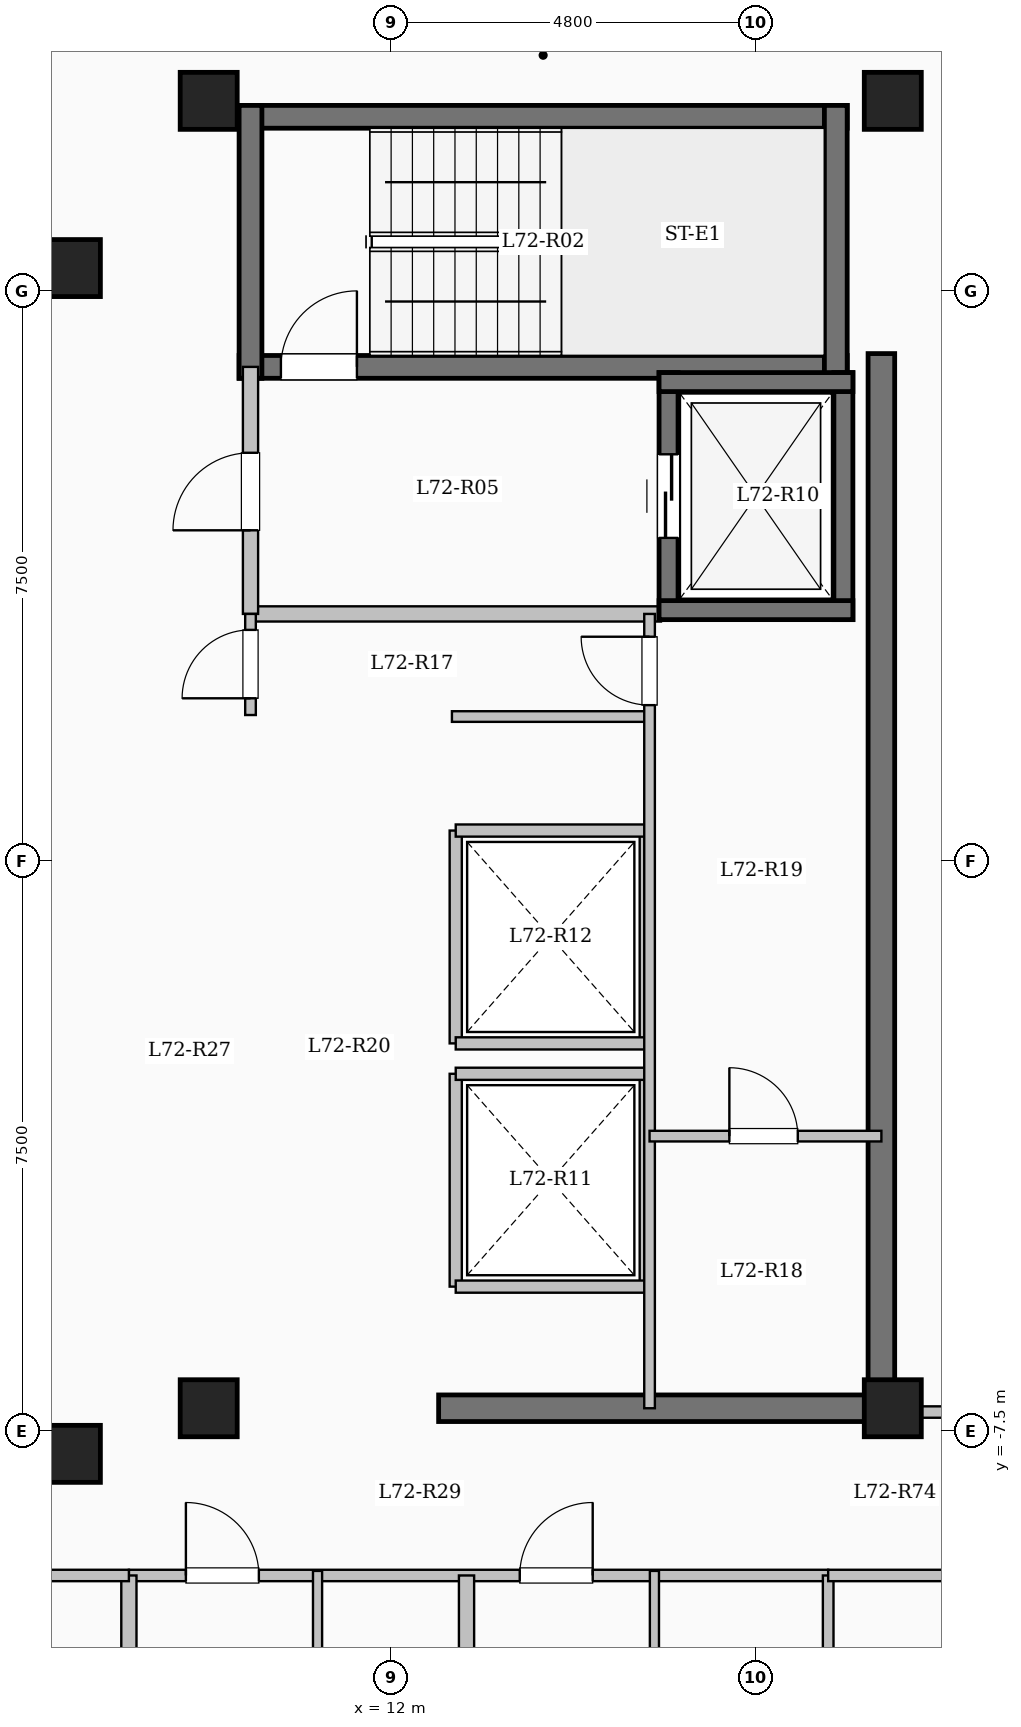
"""IFC4 building model, lengths in metres.
Left out: names, types, materials, properties, quantities, classifications, styles, units other than length and angle.
Written with IfcOpenShell. Run it as: python <this file> out.ifc"""

import sys

from ifc_helpers import new_model, si_unit, direction, frame, frame_2d, origin, origin_2d, place, context, subcontext, project, spatial, rectangle, extrude, element, fill, save


model = new_model("IFC4")
c1 = context("Model", 3, precision=1e-05, world=origin(), true_north=direction((0.0, 1.0)))
c2 = subcontext(c1, "Body", "Model", "MODEL_VIEW")
j1 = project(units=[si_unit("LENGTHUNIT", "METRE"), si_unit("PLANEANGLEUNIT", "RADIAN")], contexts=[c1])
p1 = place(None, origin())
s1 = spatial("IfcSite", under=j1, at=p1, CompositionType="ELEMENT")
p2 = place(p1, origin())
s2 = spatial("IfcBuilding", under=s1, at=p2, CompositionType="ELEMENT")
p3 = place(p2, frame((0.0, 0.0, 264.95)))
s3 = spatial("IfcBuildingStorey", under=s2, at=p3, CompositionType="ELEMENT", Elevation=264.95)
for number, where, z_axis, x_axis in (
    (1, (7.8, -7.8, 0.0), (0.0, 0.0, 1.0), (1.0, 0.0, 0.0)),
    (2, (7.8, 7.8, 0.0), (0.0, 0.0, 1.0), (1.0, 0.0, 0.0)),
    (3, (9.6, -7.2, 0.0), (0.0, 0.0, 1.0), (1.0, 0.0, 0.0)),
    (4, (9.6, 10.0, 0.0), (0.0, 0.0, 1.0), (1.0, 0.0, 0.0)),
    (5, (18.6, -7.2, 0.0), (0.0, 0.0, 1.0), (1.0, 0.0, 0.0)),
    (6, (18.6, 10.0, 0.0), (0.0, 0.0, 1.0), (1.0, 0.0, 0.0)),
):
    element("IfcColumn", number, at=place(p3, frame(where, z_axis=z_axis, x_axis=x_axis)), inside=s3, PredefinedType="COLUMN", context=c2, shape_type="SweptSolid", body=[
        extrude(rectangle(XDim=0.75, YDim=0.75, at=origin_2d()), origin(), (0.0, 0.0, 1.0), 3.35),
    ])
p4 = place(p3, frame((10.0, 9.79, 0.0), z_axis=(0.0, 0.0, 1.0), x_axis=(1.0, 0.0, 0.0)))
e7 = element("IfcWall", 7, at=p4, inside=s3, PredefinedType="SHEAR", context=c2, shape_type="SweptSolid", body=[
    extrude(rectangle(XDim=8.0, YDim=0.3, at=frame_2d((4.0, 0.0))), origin(), (0.0, 0.0, 1.0), 3.35),
])
p5 = place(p3, frame((10.0, 6.5, 0.0), z_axis=(0.0, 0.0, 1.0), x_axis=(1.0, 0.0, 0.0)))
e8 = element("IfcWall", 8, at=p5, inside=s3, PredefinedType="SHEAR", context=c2, shape_type="SweptSolid", body=[
    extrude(rectangle(XDim=8.0, YDim=0.3, at=frame_2d((4.0, 0.0))), origin(), (0.0, 0.0, 1.0), 3.35),
])
p6 = place(p5, frame((0.55, 0.0, 0.0)))
e9 = element("IfcOpeningElement", 9, at=p6, cuts=e8, PredefinedType="OPENING", context=c2, shape_type="SweptSolid", body=[
    extrude(rectangle(XDim=1.0, YDim=2.15, at=frame_2d((0.5, 1.075))), frame((0.0, 0.16, 0.0), z_axis=(0.0, -1.0, 0.0), x_axis=(1.0, 0.0, 0.0)), (0.0, 0.0, 1.0), 0.32),
])
for number, where, z_axis, x_axis in (
    (10, (10.15, 6.35, 0.0), (0.0, 0.0, 1.0), (0.0, 1.0, 0.0)),
    (11, (17.85, 6.35, 0.0), (0.0, 0.0, 1.0), (0.0, 1.0, 0.0)),
):
    element("IfcWall", number, at=place(p3, frame(where, z_axis=z_axis, x_axis=x_axis)), inside=s3, PredefinedType="SHEAR", context=c2, shape_type="SweptSolid", body=[
        extrude(rectangle(XDim=3.59, YDim=0.3, at=frame_2d((1.795, 0.0))), origin(), (0.0, 0.0, 1.0), 3.35),
    ])
p7 = place(p3, frame((10.15, 3.25, 0.0), z_axis=(0.0, 0.0, 1.0), x_axis=(1.0, 0.0, 0.0)))
e12 = element("IfcWall", 12, at=p7, inside=s3, PredefinedType="SOLIDWALL", context=c2, shape_type="SweptSolid", body=[
    extrude(rectangle(XDim=5.4, YDim=0.2, at=frame_2d((2.7, 0.0))), origin(), (0.0, 0.0, 1.0), 3.1),
])
p8 = place(p3, frame((10.15, 3.25, 0.0), z_axis=(0.0, 0.0, 1.0), x_axis=(0.0, 1.0, 0.0)))
e13 = element("IfcWall", 13, at=p8, inside=s3, PredefinedType="SOLIDWALL", context=c2, shape_type="SweptSolid", body=[
    extrude(rectangle(XDim=3.25, YDim=0.2, at=frame_2d((1.625, 0.0))), origin(), (0.0, 0.0, 1.0), 3.1),
])
p9 = place(p8, frame((1.1, 0.0, 0.0)))
e14 = element("IfcOpeningElement", 14, at=p9, cuts=e13, PredefinedType="OPENING", context=c2, shape_type="SweptSolid", body=[
    extrude(rectangle(XDim=1.02, YDim=2.15, at=frame_2d((0.51, 1.075))), frame((0.0, 0.11, 0.0), z_axis=(0.0, -1.0, 0.0), x_axis=(1.0, 0.0, 0.0)), (0.0, 0.0, 1.0), 0.22),
])
p10 = place(p3, frame((15.65, 3.175, 0.0), z_axis=(0.0, 0.0, 1.0), x_axis=(0.0, 1.0, 0.0)))
e15 = element("IfcWall", 15, at=p10, inside=s3, PredefinedType="SHEAR", context=c2, shape_type="SweptSolid", body=[
    extrude(rectangle(XDim=3.25, YDim=0.25, at=frame_2d((1.625, 0.0))), origin(), (0.0, 0.0, 1.0), 3.35),
])
p11 = place(p10, frame((1.075, 0.0, 0.0)))
e16 = element("IfcOpeningElement", 16, at=p11, cuts=e15, PredefinedType="OPENING", context=c2, shape_type="SweptSolid", body=[
    extrude(rectangle(XDim=1.1, YDim=2.15, at=frame_2d((0.55, 1.075))), frame((0.0, 0.135, 0.0), z_axis=(0.0, -1.0, 0.0), x_axis=(1.0, 0.0, 0.0)), (0.0, 0.0, 1.0), 0.27),
])
p12 = place(p3, frame((17.95, 3.175, 0.0), z_axis=(0.0, 0.0, 1.0), x_axis=(0.0, 1.0, 0.0)))
e17 = element("IfcWall", 17, at=p12, inside=s3, PredefinedType="SHEAR", context=c2, shape_type="SweptSolid", body=[
    extrude(rectangle(XDim=3.25, YDim=0.25, at=frame_2d((1.625, 0.0))), origin(), (0.0, 0.0, 1.0), 3.35),
])
for number, where, z_axis, x_axis in (
    (18, (15.525, 3.3, 0.0), (0.0, 0.0, 1.0), (1.0, 0.0, 0.0)),
    (19, (15.525, 6.3, 0.0), (0.0, 0.0, 1.0), (1.0, 0.0, 0.0)),
):
    element("IfcWall", number, at=place(p3, frame(where, z_axis=z_axis, x_axis=x_axis)), inside=s3, PredefinedType="SHEAR", context=c2, shape_type="SweptSolid", body=[
        extrude(rectangle(XDim=2.55, YDim=0.25, at=frame_2d((1.275, 0.0))), origin(), (0.0, 0.0, 1.0), 3.35),
    ])
for number, where, z_axis, x_axis in (
    (20, (12.85, -5.6, 0.0), (0.0, 0.0, 1.0), (0.0, 1.0, 0.0)),
    (21, (15.35, -5.6, 0.0), (0.0, 0.0, 1.0), (0.0, 1.0, 0.0)),
):
    element("IfcWall", number, at=place(p3, frame(where, z_axis=z_axis, x_axis=x_axis)), inside=s3, PredefinedType="SOLIDWALL", context=c2, shape_type="SweptSolid", body=[
        extrude(rectangle(XDim=2.8, YDim=0.16, at=frame_2d((1.4, 0.0))), origin(), (0.0, 0.0, 1.0), 3.1),
    ])
for number, where, z_axis, x_axis in (
    (22, (12.85, -5.6, 0.0), (0.0, 0.0, 1.0), (1.0, 0.0, 0.0)),
    (23, (12.85, -2.8, 0.0), (0.0, 0.0, 1.0), (1.0, 0.0, 0.0)),
):
    element("IfcWall", number, at=place(p3, frame(where, z_axis=z_axis, x_axis=x_axis)), inside=s3, PredefinedType="SOLIDWALL", context=c2, shape_type="SweptSolid", body=[
        extrude(rectangle(XDim=2.5, YDim=0.16, at=frame_2d((1.25, 0.0))), origin(), (0.0, 0.0, 1.0), 3.1),
    ])
for number, where, z_axis, x_axis in (
    (24, (12.85, -2.4, 0.0), (0.0, 0.0, 1.0), (0.0, 1.0, 0.0)),
    (25, (15.35, -2.4, 0.0), (0.0, 0.0, 1.0), (0.0, 1.0, 0.0)),
):
    element("IfcWall", number, at=place(p3, frame(where, z_axis=z_axis, x_axis=x_axis)), inside=s3, PredefinedType="SOLIDWALL", context=c2, shape_type="SweptSolid", body=[
        extrude(rectangle(XDim=2.8, YDim=0.16, at=frame_2d((1.4, 0.0))), origin(), (0.0, 0.0, 1.0), 3.1),
    ])
for number, where, z_axis, x_axis in (
    (26, (12.85, -2.4, 0.0), (0.0, 0.0, 1.0), (1.0, 0.0, 0.0)),
    (27, (12.85, 0.4, 0.0), (0.0, 0.0, 1.0), (1.0, 0.0, 0.0)),
):
    element("IfcWall", number, at=place(p3, frame(where, z_axis=z_axis, x_axis=x_axis)), inside=s3, PredefinedType="SOLIDWALL", context=c2, shape_type="SweptSolid", body=[
        extrude(rectangle(XDim=2.5, YDim=0.16, at=frame_2d((1.25, 0.0))), origin(), (0.0, 0.0, 1.0), 3.1),
    ])
p13 = place(p3, frame((18.45, -7.375, 0.0), z_axis=(0.0, 0.0, 1.0), x_axis=(0.0, 1.0, 0.0)))
e28 = element("IfcWall", 28, at=p13, inside=s3, PredefinedType="SHEAR", context=c2, shape_type="SweptSolid", body=[
    extrude(rectangle(XDim=14.05, YDim=0.35, at=frame_2d((7.025, 0.0))), origin(), (0.0, 0.0, 1.0), 3.35),
])
p14 = place(p3, frame((12.625, -7.2, 0.0), z_axis=(0.0, 0.0, 1.0), x_axis=(1.0, 0.0, 0.0)))
e29 = element("IfcWall", 29, at=p14, inside=s3, PredefinedType="SHEAR", context=c2, shape_type="SweptSolid", body=[
    extrude(rectangle(XDim=6.0, YDim=0.35, at=frame_2d((3.0, 0.0))), origin(), (0.0, 0.0, 1.0), 3.35),
])
p15 = place(p3, frame((12.8, 1.9, 0.0), z_axis=(0.0, 0.0, 1.0), x_axis=(1.0, 0.0, 0.0)))
e30 = element("IfcWall", 30, at=p15, inside=s3, PredefinedType="PARTITIONING", context=c2, shape_type="SweptSolid", body=[
    extrude(rectangle(XDim=2.6, YDim=0.14, at=frame_2d((1.3, 0.0))), origin(), (0.0, 0.0, 1.0), 3.1),
])
p16 = place(p3, frame((10.15, 1.92, 0.0), z_axis=(0.0, 0.0, 1.0), x_axis=(0.0, 1.0, 0.0)))
e31 = element("IfcWall", 31, at=p16, inside=s3, PredefinedType="PARTITIONING", context=c2, shape_type="SweptSolid", body=[
    extrude(rectangle(XDim=1.33, YDim=0.14, at=frame_2d((0.665, 0.0))), origin(), (0.0, 0.0, 1.0), 3.1),
])
p17 = place(p16, frame((0.22, 0.0, 0.0)))
e32 = element("IfcOpeningElement", 32, at=p17, cuts=e31, PredefinedType="OPENING", context=c2, shape_type="SweptSolid", body=[
    extrude(rectangle(XDim=0.9, YDim=2.08, at=frame_2d((0.45, 1.04))), frame((0.0, 0.08, 0.0), z_axis=(0.0, -1.0, 0.0), x_axis=(1.0, 0.0, 0.0)), (0.0, 0.0, 1.0), 0.16),
])
p18 = place(p3, frame((15.4, -7.2, 0.0), z_axis=(0.0, 0.0, 1.0), x_axis=(0.0, 1.0, 0.0)))
e33 = element("IfcWall", 33, at=p18, inside=s3, PredefinedType="PARTITIONING", context=c2, shape_type="SweptSolid", body=[
    extrude(rectangle(XDim=10.45, YDim=0.14, at=frame_2d((5.225, 0.0))), origin(), (0.0, 0.0, 1.0), 3.1),
])
p19 = place(p18, frame((9.25, 0.0, 0.0)))
e34 = element("IfcOpeningElement", 34, at=p19, cuts=e33, PredefinedType="OPENING", context=c2, shape_type="SweptSolid", body=[
    extrude(rectangle(XDim=0.9, YDim=2.08, at=frame_2d((0.45, 1.04))), frame((0.0, 0.08, 0.0), z_axis=(0.0, -1.0, 0.0), x_axis=(1.0, 0.0, 0.0)), (0.0, 0.0, 1.0), 0.16),
])
p20 = place(p3, frame((15.4, -3.62, 0.0), z_axis=(0.0, 0.0, 1.0), x_axis=(1.0, 0.0, 0.0)))
e35 = element("IfcWall", 35, at=p20, inside=s3, PredefinedType="PARTITIONING", context=c2, shape_type="SweptSolid", body=[
    extrude(rectangle(XDim=3.05, YDim=0.14, at=frame_2d((1.525, 0.0))), origin(), (0.0, 0.0, 1.0), 3.1),
])
p21 = place(p20, frame((1.05, 0.0, 0.0)))
e36 = element("IfcOpeningElement", 36, at=p21, cuts=e35, PredefinedType="OPENING", context=c2, shape_type="SweptSolid", body=[
    extrude(rectangle(XDim=0.9, YDim=2.08, at=frame_2d((0.45, 1.04))), frame((0.0, 0.08, 0.0), z_axis=(0.0, -1.0, 0.0), x_axis=(1.0, 0.0, 0.0)), (0.0, 0.0, 1.0), 0.16),
])
p22 = place(p3, frame((8.55, -9.4, 0.0), z_axis=(0.0, 0.0, 1.0), x_axis=(1.0, 0.0, 0.0)))
e37 = element("IfcWall", 37, at=p22, inside=s3, PredefinedType="PARTITIONING", context=c2, shape_type="SweptSolid", body=[
    extrude(rectangle(XDim=9.2, YDim=0.15, at=frame_2d((4.6, 0.0))), origin(), (0.0, 0.0, 1.0), 3.1),
])
p23 = place(p22, frame((0.75, 0.0, 0.0)))
e38 = element("IfcOpeningElement", 38, at=p23, cuts=e37, PredefinedType="OPENING", context=c2, shape_type="SweptSolid", body=[
    extrude(rectangle(XDim=0.96, YDim=2.15, at=frame_2d((0.48, 1.075))), frame((0.0, 0.085, 0.0), z_axis=(0.0, -1.0, 0.0), x_axis=(1.0, 0.0, 0.0)), (0.0, 0.0, 1.0), 0.17),
])
p24 = place(p22, frame((5.142, 0.0, 0.0)))
e39 = element("IfcOpeningElement", 39, at=p24, cuts=e37, PredefinedType="OPENING", context=c2, shape_type="SweptSolid", body=[
    extrude(rectangle(XDim=0.96, YDim=2.15, at=frame_2d((0.48, 1.075))), frame((0.0, 0.085, 0.0), z_axis=(0.0, -1.0, 0.0), x_axis=(1.0, 0.0, 0.0)), (0.0, 0.0, 1.0), 0.17),
])
p25 = place(p3, frame((12.992, -20.9, 0.0), z_axis=(0.0, 0.0, 1.0), x_axis=(0.0, 1.0, 0.0)))
e40 = element("IfcWall", 40, at=p25, inside=s3, PredefinedType="SOLIDWALL", context=c2, shape_type="SweptSolid", body=[
    extrude(rectangle(XDim=11.5, YDim=0.2, at=frame_2d((5.75, 0.0))), origin(), (0.0, 0.0, 1.0), 3.1),
])
p26 = place(p3, frame((11.032, -12.56, 0.0), z_axis=(0.0, 0.0, 1.0), x_axis=(0.0, 1.0, 0.0)))
e41 = element("IfcWall", 41, at=p26, inside=s3, PredefinedType="PARTITIONING", context=c2, shape_type="SweptSolid", body=[
    extrude(rectangle(XDim=3.22, YDim=0.12, at=frame_2d((1.61, 0.0))), origin(), (0.0, 0.0, 1.0), 3.1),
])
p27 = place(p26, frame((1.14, 0.0, 0.0)))
e42 = element("IfcOpeningElement", 42, at=p27, cuts=e41, PredefinedType="OPENING", context=c2, shape_type="SweptSolid", body=[
    extrude(rectangle(XDim=0.88, YDim=2.1, at=frame_2d((0.44, 1.05))), frame((0.0, 0.07, 0.0), z_axis=(0.0, -1.0, 0.0), x_axis=(1.0, 0.0, 0.0)), (0.0, 0.0, 1.0), 0.14),
])
p28 = place(p3, frame((15.464, -12.56, 0.0), z_axis=(0.0, 0.0, 1.0), x_axis=(0.0, 1.0, 0.0)))
e43 = element("IfcWall", 43, at=p28, inside=s3, PredefinedType="PARTITIONING", context=c2, shape_type="SweptSolid", body=[
    extrude(rectangle(XDim=3.22, YDim=0.12, at=frame_2d((1.61, 0.0))), origin(), (0.0, 0.0, 1.0), 3.1),
])
p29 = place(p28, frame((1.14, 0.0, 0.0)))
e44 = element("IfcOpeningElement", 44, at=p29, cuts=e43, PredefinedType="OPENING", context=c2, shape_type="SweptSolid", body=[
    extrude(rectangle(XDim=0.88, YDim=2.1, at=frame_2d((0.44, 1.05))), frame((0.0, 0.07, 0.0), z_axis=(0.0, -1.0, 0.0), x_axis=(1.0, 0.0, 0.0)), (0.0, 0.0, 1.0), 0.14),
])
p30 = place(p3, frame((8.55, -21.504, 0.0), z_axis=(0.0, 0.0, 1.0), x_axis=(0.0, 1.0, 0.0)))
e45 = element("IfcWall", 45, at=p30, inside=s3, PredefinedType="SOLIDWALL", context=c2, shape_type="SweptSolid", body=[
    extrude(rectangle(XDim=12.104, YDim=0.2, at=frame_2d((6.052, 0.0))), origin(), (0.0, 0.0, 1.0), 3.1),
])
p31 = place(p3, frame((-8.55, -9.4, 0.0), z_axis=(0.0, 0.0, 1.0), x_axis=(1.0, 0.0, 0.0)))
e46 = element("IfcWall", 46, at=p31, inside=s3, PredefinedType="PARTITIONING", context=c2, shape_type="SweptSolid", body=[
    extrude(rectangle(XDim=17.1, YDim=0.15, at=frame_2d((8.55, 0.0))), origin(), (0.0, 0.0, 1.0), 3.1),
])
p32 = place(p31, frame((1.75, 0.0, 0.0)))
e47 = element("IfcOpeningElement", 47, at=p32, cuts=e46, PredefinedType="OPENING", context=c2, shape_type="SweptSolid", body=[
    extrude(rectangle(XDim=0.96, YDim=2.15, at=frame_2d((0.48, 1.075))), frame((0.0, 0.085, 0.0), z_axis=(0.0, -1.0, 0.0), x_axis=(1.0, 0.0, 0.0)), (0.0, 0.0, 1.0), 0.17),
])
p33 = place(p3, frame((18.45, -7.25, 0.0), z_axis=(0.0, 0.0, 1.0), x_axis=(1.0, 0.0, 0.0)))
e48 = element("IfcWall", 48, at=p33, inside=s3, PredefinedType="PARTITIONING", context=c2, shape_type="SweptSolid", body=[
    extrude(rectangle(XDim=4.23, YDim=0.15, at=frame_2d((2.115, 0.0))), origin(), (0.0, 0.0, 1.0), 3.1),
])
p34 = place(p33, frame((1.5, 0.0, 0.0)))
e49 = element("IfcOpeningElement", 49, at=p34, cuts=e48, PredefinedType="OPENING", context=c2, shape_type="SweptSolid", body=[
    extrude(rectangle(XDim=1.08, YDim=2.15, at=frame_2d((0.54, 1.075))), frame((0.0, 0.085, 0.0), z_axis=(0.0, -1.0, 0.0), x_axis=(1.0, 0.0, 0.0)), (0.0, 0.0, 1.0), 0.17),
])
p35 = place(p3, frame((17.75, -17.55, 0.0), z_axis=(0.0, 0.0, 1.0), x_axis=(0.0, 1.0, 0.0)))
e50 = element("IfcWall", 50, at=p35, inside=s3, PredefinedType="PARTITIONING", context=c2, shape_type="SweptSolid", body=[
    extrude(rectangle(XDim=8.15, YDim=0.14, at=frame_2d((4.075, 0.0))), origin(), (0.0, 0.0, 1.0), 3.1),
])
p36 = place(p3, frame((17.75, -9.4, 0.0), z_axis=(0.0, 0.0, 1.0), x_axis=(1.0, 0.0, 0.0)))
e51 = element("IfcWall", 51, at=p36, inside=s3, PredefinedType="PARTITIONING", context=c2, shape_type="SweptSolid", body=[
    extrude(rectangle(XDim=4.93, YDim=0.15, at=frame_2d((2.465, 0.0))), origin(), (0.0, 0.0, 1.0), 3.1),
])
p37 = place(p36, frame((1.99, 0.0, 0.0)))
e52 = element("IfcOpeningElement", 52, at=p37, cuts=e51, PredefinedType="OPENING", context=c2, shape_type="SweptSolid", body=[
    extrude(rectangle(XDim=0.95, YDim=2.15, at=frame_2d((0.475, 1.075))), frame((0.0, 0.085, 0.0), z_axis=(0.0, -1.0, 0.0), x_axis=(1.0, 0.0, 0.0)), (0.0, 0.0, 1.0), 0.17),
])
p38 = place(p6, origin())
e53 = element("IfcDoor", 53, at=p38, inside=s3, OperationType="SINGLE_SWING_RIGHT", PredefinedType="DOOR", context=c2, shape_type="SweptSolid", body=[
    extrude(rectangle(XDim=1.0, YDim=2.15, at=frame_2d((0.5, 1.075))), frame((0.0, 0.025, 0.0), z_axis=(0.0, -1.0, 0.0), x_axis=(1.0, 0.0, 0.0)), (0.0, 0.0, 1.0), 0.05),
])
fill(e9, e53)
p39 = place(p9, origin())
e54 = element("IfcDoor", 54, at=p39, inside=s3, OperationType="SINGLE_SWING_LEFT", PredefinedType="DOOR", context=c2, shape_type="SweptSolid", body=[
    extrude(rectangle(XDim=1.02, YDim=2.15, at=frame_2d((0.51, 1.075))), frame((0.0, 0.025, 0.0), z_axis=(0.0, -1.0, 0.0), x_axis=(1.0, 0.0, 0.0)), (0.0, 0.0, 1.0), 0.05),
])
fill(e14, e54)
p40 = place(p11, origin())
e55 = element("IfcDoor", 55, at=p40, inside=s3, OperationType="SLIDING_TO_LEFT", PredefinedType="DOOR", context=c2, shape_type="SweptSolid", body=[
    extrude(rectangle(XDim=1.1, YDim=2.15, at=frame_2d((0.55, 1.075))), frame((0.0, 0.025, 0.0), z_axis=(0.0, -1.0, 0.0), x_axis=(1.0, 0.0, 0.0)), (0.0, 0.0, 1.0), 0.05),
])
fill(e16, e55)
p41 = place(p17, origin())
e56 = element("IfcDoor", 56, at=p41, inside=s3, OperationType="SINGLE_SWING_LEFT", PredefinedType="DOOR", context=c2, shape_type="SweptSolid", body=[
    extrude(rectangle(XDim=0.9, YDim=2.08, at=frame_2d((0.45, 1.04))), frame((0.0, 0.025, 0.0), z_axis=(0.0, -1.0, 0.0), x_axis=(1.0, 0.0, 0.0)), (0.0, 0.0, 1.0), 0.05),
])
fill(e32, e56)
p42 = place(p19, origin())
e57 = element("IfcDoor", 57, at=p42, inside=s3, OperationType="SINGLE_SWING_RIGHT", PredefinedType="DOOR", context=c2, shape_type="SweptSolid", body=[
    extrude(rectangle(XDim=0.9, YDim=2.08, at=frame_2d((0.45, 1.04))), frame((0.0, 0.025, 0.0), z_axis=(0.0, -1.0, 0.0), x_axis=(1.0, 0.0, 0.0)), (0.0, 0.0, 1.0), 0.05),
])
fill(e34, e57)
p43 = place(p21, origin())
e58 = element("IfcDoor", 58, at=p43, inside=s3, OperationType="SINGLE_SWING_LEFT", PredefinedType="DOOR", context=c2, shape_type="SweptSolid", body=[
    extrude(rectangle(XDim=0.9, YDim=2.08, at=frame_2d((0.45, 1.04))), frame((0.0, 0.025, 0.0), z_axis=(0.0, -1.0, 0.0), x_axis=(1.0, 0.0, 0.0)), (0.0, 0.0, 1.0), 0.05),
])
fill(e36, e58)
p44 = place(p23, origin())
e59 = element("IfcDoor", 59, at=p44, inside=s3, OperationType="SINGLE_SWING_LEFT", PredefinedType="DOOR", context=c2, shape_type="SweptSolid", body=[
    extrude(rectangle(XDim=0.96, YDim=2.15, at=frame_2d((0.48, 1.075))), frame((0.0, 0.025, 0.0), z_axis=(0.0, -1.0, 0.0), x_axis=(1.0, 0.0, 0.0)), (0.0, 0.0, 1.0), 0.05),
])
fill(e38, e59)
p45 = place(p24, origin())
e60 = element("IfcDoor", 60, at=p45, inside=s3, OperationType="SINGLE_SWING_RIGHT", PredefinedType="DOOR", context=c2, shape_type="SweptSolid", body=[
    extrude(rectangle(XDim=0.96, YDim=2.15, at=frame_2d((0.48, 1.075))), frame((0.0, 0.025, 0.0), z_axis=(0.0, -1.0, 0.0), x_axis=(1.0, 0.0, 0.0)), (0.0, 0.0, 1.0), 0.05),
])
fill(e39, e60)
save(model, sys.argv[1])
